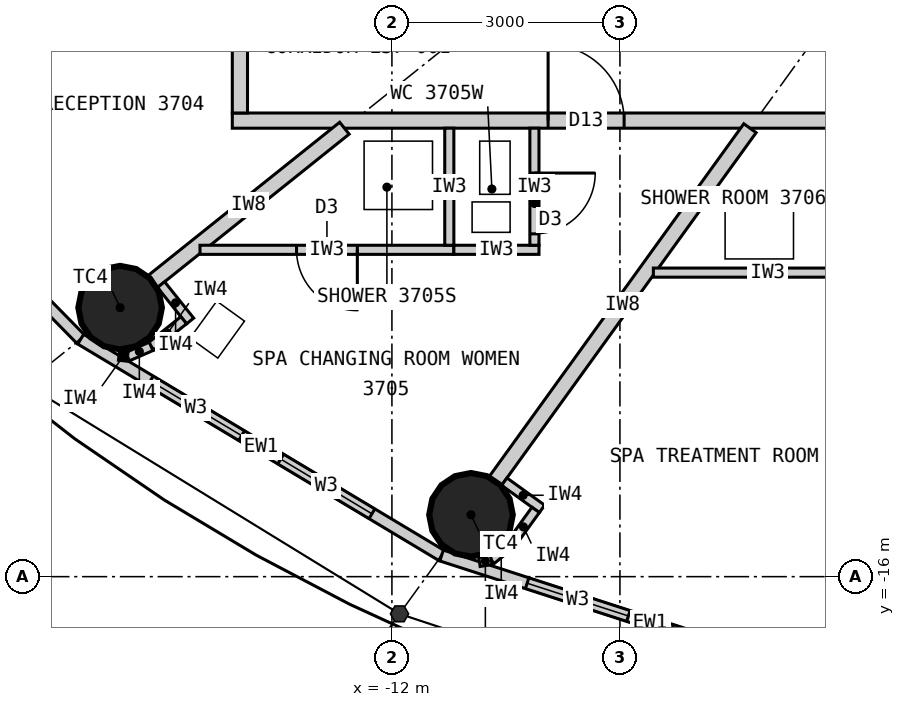
"""IFC4 building model, lengths in metres.
Left out: names, types, materials, properties, quantities, classifications, styles, units other than length and angle.
Written with IfcOpenShell. Run it as: python <this file> out.ifc"""

import sys

from ifc_helpers import new_model, si_unit, direction, frame, frame_2d, origin, origin_2d, place, context, subcontext, project, spatial, rectangle, circle, extrude, element, fill, save


model = new_model("IFC4")
c1 = context("Model", 3, precision=1e-05, world=origin(), true_north=direction((0.0, 1.0)))
c2 = subcontext(c1, "Body", "Model", "MODEL_VIEW")
j1 = project(units=[si_unit("LENGTHUNIT", "METRE"), si_unit("PLANEANGLEUNIT", "RADIAN")], contexts=[c1])
p1 = place(None, origin())
s1 = spatial("IfcSite", under=j1, at=p1, CompositionType="ELEMENT")
p2 = place(p1, origin())
s2 = spatial("IfcBuilding", under=s1, at=p2, CompositionType="ELEMENT")
p3 = place(p2, frame((0.0, 0.0, 143.4)))
s3 = spatial("IfcBuildingStorey", under=s2, at=p3, CompositionType="ELEMENT", Elevation=143.4)
for number, where, z_axis, x_axis in (
    (1, (-15.576, -12.461, 0.0), (0.0, 0.0, 1.0), (1.0, 0.0, 0.0)),
    (2, (-10.96, -15.186, 0.0), (0.0, 0.0, 1.0), (1.0, 0.0, 0.0)),
):
    element("IfcColumn", number, at=place(p3, frame(where, z_axis=z_axis, x_axis=x_axis)), inside=s3, PredefinedType="COLUMN", context=c2, shape_type="SweptSolid", body=[
        extrude(circle(Radius=0.55, at=origin_2d()), origin(), (0.0, 0.0, 1.0), 3.3),
    ])
p4 = place(p3, frame((-19.772, -9.132, 0.0), z_axis=(0.0, 0.0, 1.0), x_axis=(0.700727467776, -0.71342905457, 0.0)))
e3 = element("IfcWall", 3, at=p4, inside=s3, PredefinedType="ELEMENTEDWALL", context=c2, shape_type="SweptSolid", body=[
    extrude(rectangle(XDim=5.247, YDim=0.15, at=frame_2d((2.624, 0.0))), origin(), (0.0, 0.0, 1.0), 3.12),
])
p5 = place(p4, frame((0.924, 0.0, 0.9)))
e4 = element("IfcOpeningElement", 4, at=p5, cuts=e3, PredefinedType="OPENING", context=c2, shape_type="SweptSolid", body=[
    extrude(rectangle(XDim=1.4, YDim=1.9, at=frame_2d((0.7, 0.95))), frame((0.0, 0.085, 0.0), z_axis=(0.0, -1.0, 0.0), x_axis=(1.0, 0.0, 0.0)), (0.0, 0.0, 1.0), 0.17),
])
p6 = place(p4, frame((2.924, 0.0, 0.9)))
e5 = element("IfcOpeningElement", 5, at=p6, cuts=e3, PredefinedType="OPENING", context=c2, shape_type="SweptSolid", body=[
    extrude(rectangle(XDim=1.4, YDim=1.9, at=frame_2d((0.7, 0.95))), frame((0.0, 0.085, 0.0), z_axis=(0.0, -1.0, 0.0), x_axis=(1.0, 0.0, 0.0)), (0.0, 0.0, 1.0), 0.17),
])
p7 = place(p3, frame((-16.095, -12.876, 0.0), z_axis=(0.0, 0.0, 1.0), x_axis=(0.857695199231, -0.514158482587, 0.0)))
e6 = element("IfcWall", 6, at=p7, inside=s3, PredefinedType="ELEMENTEDWALL", context=c2, shape_type="SweptSolid", body=[
    extrude(rectangle(XDim=5.536, YDim=0.15, at=frame_2d((2.768, 0.0))), origin(), (0.0, 0.0, 1.0), 3.12),
])
p8 = place(p7, frame((1.068, 0.0, 0.9)))
e7 = element("IfcOpeningElement", 7, at=p8, cuts=e6, PredefinedType="OPENING", context=c2, shape_type="SweptSolid", body=[
    extrude(rectangle(XDim=1.4, YDim=1.9, at=frame_2d((0.7, 0.95))), frame((0.0, 0.085, 0.0), z_axis=(0.0, -1.0, 0.0), x_axis=(1.0, 0.0, 0.0)), (0.0, 0.0, 1.0), 0.17),
])
p9 = place(p7, frame((3.068, 0.0, 0.9)))
e8 = element("IfcOpeningElement", 8, at=p9, cuts=e6, PredefinedType="OPENING", context=c2, shape_type="SweptSolid", body=[
    extrude(rectangle(XDim=1.4, YDim=1.9, at=frame_2d((0.7, 0.95))), frame((0.0, 0.085, 0.0), z_axis=(0.0, -1.0, 0.0), x_axis=(1.0, 0.0, 0.0)), (0.0, 0.0, 1.0), 0.17),
])
p10 = place(p3, frame((-11.346, -15.722, 0.0), z_axis=(0.0, 0.0, 1.0), x_axis=(0.951432482129, -0.307857486429, 0.0)))
e9 = element("IfcWall", 9, at=p10, inside=s3, PredefinedType="ELEMENTEDWALL", context=c2, shape_type="SweptSolid", body=[
    extrude(rectangle(XDim=5.766, YDim=0.15, at=frame_2d((2.883, 0.0))), origin(), (0.0, 0.0, 1.0), 3.12),
])
p11 = place(p10, frame((1.183, 0.0, 0.9)))
e10 = element("IfcOpeningElement", 10, at=p11, cuts=e9, PredefinedType="OPENING", context=c2, shape_type="SweptSolid", body=[
    extrude(rectangle(XDim=1.4, YDim=1.9, at=frame_2d((0.7, 0.95))), frame((0.0, 0.085, 0.0), z_axis=(0.0, -1.0, 0.0), x_axis=(1.0, 0.0, 0.0)), (0.0, 0.0, 1.0), 0.17),
])
p12 = place(p10, frame((3.183, 0.0, 0.9)))
e11 = element("IfcOpeningElement", 11, at=p12, cuts=e9, PredefinedType="OPENING", context=c2, shape_type="SweptSolid", body=[
    extrude(rectangle(XDim=1.4, YDim=1.9, at=frame_2d((0.7, 0.95))), frame((0.0, 0.085, 0.0), z_axis=(0.0, -1.0, 0.0), x_axis=(1.0, 0.0, 0.0)), (0.0, 0.0, 1.0), 0.17),
])
p13 = place(p3, frame((14.1, -10.0, 0.0), z_axis=(0.0, 0.0, 1.0), x_axis=(-1.0, 0.0, 0.0)))
e12 = element("IfcWall", 12, at=p13, inside=s3, PredefinedType="PARTITIONING", context=c2, shape_type="SweptSolid", body=[
    extrude(rectangle(XDim=28.2, YDim=0.2, at=frame_2d((14.1, 0.0))), origin(), (0.0, 0.0, 1.0), 3.12),
])
p14 = place(p13, frame((23.045, 0.0, 0.0)))
e13 = element("IfcOpeningElement", 13, at=p14, cuts=e12, PredefinedType="OPENING", context=c2, shape_type="SweptSolid", body=[
    extrude(rectangle(XDim=1.0, YDim=2.2, at=frame_2d((0.5, 1.1))), frame((0.0, 0.11, 0.0), z_axis=(0.0, -1.0, 0.0), x_axis=(1.0, 0.0, 0.0)), (0.0, 0.0, 1.0), 0.22),
])
p15 = place(p13, frame((18.529, 0.0, 0.0)))
e14 = element("IfcOpeningElement", 14, at=p15, cuts=e12, PredefinedType="OPENING", context=c2, shape_type="SweptSolid", body=[
    extrude(rectangle(XDim=1.0, YDim=2.2, at=frame_2d((0.5, 1.1))), frame((0.0, 0.11, 0.0), z_axis=(0.0, -1.0, 0.0), x_axis=(1.0, 0.0, 0.0)), (0.0, 0.0, 1.0), 0.22),
])
p16 = place(p13, frame((13.923, 0.0, 0.0)))
e15 = element("IfcOpeningElement", 15, at=p16, cuts=e12, PredefinedType="OPENING", context=c2, shape_type="SweptSolid", body=[
    extrude(rectangle(XDim=1.0, YDim=2.2, at=frame_2d((0.5, 1.1))), frame((0.0, 0.11, 0.0), z_axis=(0.0, -1.0, 0.0), x_axis=(1.0, 0.0, 0.0)), (0.0, 0.0, 1.0), 0.22),
])
p17 = place(p13, frame((9.35, 0.0, 0.0)))
e16 = element("IfcOpeningElement", 16, at=p17, cuts=e12, PredefinedType="OPENING", context=c2, shape_type="SweptSolid", body=[
    extrude(rectangle(XDim=1.6, YDim=2.4, at=frame_2d((0.8, 1.2))), frame((0.0, 0.11, 0.0), z_axis=(0.0, -1.0, 0.0), x_axis=(1.0, 0.0, 0.0)), (0.0, 0.0, 1.0), 0.22),
])
p18 = place(p3, frame((-14.0, 9.9, 0.0), z_axis=(0.0, 0.0, 1.0), x_axis=(0.0, -1.0, 0.0)))
e17 = element("IfcWall", 17, at=p18, inside=s3, PredefinedType="PARTITIONING", context=c2, shape_type="SweptSolid", body=[
    extrude(rectangle(XDim=19.8, YDim=0.2, at=frame_2d((9.9, 0.0))), origin(), (0.0, 0.0, 1.0), 3.12),
])
p19 = place(p18, frame((8.718, 0.0, 0.0)))
e18 = element("IfcOpeningElement", 18, at=p19, cuts=e17, PredefinedType="OPENING", context=c2, shape_type="SweptSolid", body=[
    extrude(rectangle(XDim=1.0, YDim=2.2, at=frame_2d((0.5, 1.1))), frame((0.0, 0.11, 0.0), z_axis=(0.0, -1.0, 0.0), x_axis=(1.0, 0.0, 0.0)), (0.0, 0.0, 1.0), 0.22),
])
p20 = place(p18, frame((11.74, 0.0, 0.0)))
e19 = element("IfcOpeningElement", 19, at=p20, cuts=e17, PredefinedType="OPENING", context=c2, shape_type="SweptSolid", body=[
    extrude(rectangle(XDim=1.0, YDim=2.2, at=frame_2d((0.5, 1.1))), frame((0.0, 0.11, 0.0), z_axis=(0.0, -1.0, 0.0), x_axis=(1.0, 0.0, 0.0)), (0.0, 0.0, 1.0), 0.22),
])
p21 = place(p18, frame((14.782, 0.0, 0.0)))
e20 = element("IfcOpeningElement", 20, at=p21, cuts=e17, PredefinedType="OPENING", context=c2, shape_type="SweptSolid", body=[
    extrude(rectangle(XDim=1.0, YDim=2.2, at=frame_2d((0.5, 1.1))), frame((0.0, 0.11, 0.0), z_axis=(0.0, -1.0, 0.0), x_axis=(1.0, 0.0, 0.0)), (0.0, 0.0, 1.0), 0.22),
])
p22 = place(p18, frame((17.707, 0.0, 0.0)))
e21 = element("IfcOpeningElement", 21, at=p22, cuts=e17, PredefinedType="OPENING", context=c2, shape_type="SweptSolid", body=[
    extrude(rectangle(XDim=1.0, YDim=2.2, at=frame_2d((0.5, 1.1))), frame((0.0, 0.11, 0.0), z_axis=(0.0, -1.0, 0.0), x_axis=(1.0, 0.0, 0.0)), (0.0, 0.0, 1.0), 0.22),
])
p23 = place(p18, frame((3.824, 0.0, 0.0)))
e22 = element("IfcOpeningElement", 22, at=p23, cuts=e17, PredefinedType="OPENING", context=c2, shape_type="SweptSolid", body=[
    extrude(rectangle(XDim=1.0, YDim=2.2, at=frame_2d((0.5, 1.1))), frame((0.0, 0.11, 0.0), z_axis=(0.0, -1.0, 0.0), x_axis=(1.0, 0.0, 0.0)), (0.0, 0.0, 1.0), 0.22),
])
p24 = place(p3, frame((-12.625, -10.1, 0.0), z_axis=(0.0, 0.0, 1.0), x_axis=(-0.780876185034, -0.624685827954, 0.0)))
e23 = element("IfcWall", 23, at=p24, inside=s3, PredefinedType="PARTITIONING", context=c2, shape_type="SweptSolid", body=[
    extrude(rectangle(XDim=3.229, YDim=0.2, at=frame_2d((1.615, 0.0))), origin(), (0.0, 0.0, 1.0), 2.27),
])
p25 = place(p3, frame((-7.289, -10.1, 0.0), z_axis=(0.0, 0.0, 1.0), x_axis=(-0.585222595178, -0.810872686735, 0.0)))
e24 = element("IfcWall", 24, at=p25, inside=s3, PredefinedType="PARTITIONING", context=c2, shape_type="SweptSolid", body=[
    extrude(rectangle(XDim=5.722, YDim=0.2, at=frame_2d((2.861, 0.0))), origin(), (0.0, 0.0, 1.0), 2.27),
])
p26 = place(p3, frame((-14.525, -11.7, 0.0), z_axis=(0.0, 0.0, 1.0), x_axis=(1.0, 0.0, 0.0)))
e25 = element("IfcWall", 25, at=p26, inside=s3, PredefinedType="PARTITIONING", context=c2, shape_type="SweptSolid", body=[
    extrude(rectangle(XDim=3.34, YDim=0.12, at=frame_2d((1.67, 0.0))), origin(), (0.0, 0.0, 1.0), 3.12),
])
p27 = place(p26, frame((1.27, 0.0, 0.0)))
e26 = element("IfcOpeningElement", 26, at=p27, cuts=e25, PredefinedType="OPENING", context=c2, shape_type="SweptSolid", body=[
    extrude(rectangle(XDim=0.8, YDim=2.1, at=frame_2d((0.4, 1.05))), frame((0.0, 0.07, 0.0), z_axis=(0.0, -1.0, 0.0), x_axis=(1.0, 0.0, 0.0)), (0.0, 0.0, 1.0), 0.14),
])
p28 = place(p3, frame((-11.245, -10.1, 0.0), z_axis=(0.0, 0.0, 1.0), x_axis=(0.0, -1.0, 0.0)))
e27 = element("IfcWall", 27, at=p28, inside=s3, PredefinedType="PARTITIONING", context=c2, shape_type="SweptSolid", body=[
    extrude(rectangle(XDim=1.54, YDim=0.12, at=frame_2d((0.77, 0.0))), origin(), (0.0, 0.0, 1.0), 3.12),
])
p29 = place(p3, frame((-11.185, -11.7, 0.0), z_axis=(0.0, 0.0, 1.0), x_axis=(1.0, 0.0, 0.0)))
e28 = element("IfcWall", 28, at=p29, inside=s3, PredefinedType="PARTITIONING", context=c2, shape_type="SweptSolid", body=[
    extrude(rectangle(XDim=1.12, YDim=0.12, at=frame_2d((0.56, 0.0))), origin(), (0.0, 0.0, 1.0), 3.12),
])
p30 = place(p3, frame((-10.125, -10.1, 0.0), z_axis=(0.0, 0.0, 1.0), x_axis=(0.0, -1.0, 0.0)))
e29 = element("IfcWall", 29, at=p30, inside=s3, PredefinedType="PARTITIONING", context=c2, shape_type="SweptSolid", body=[
    extrude(rectangle(XDim=1.54, YDim=0.12, at=frame_2d((0.77, 0.0))), origin(), (0.0, 0.0, 1.0), 3.12),
])
p31 = place(p30, frame((0.59, 0.0, 0.0)))
e30 = element("IfcOpeningElement", 30, at=p31, cuts=e29, PredefinedType="OPENING", context=c2, shape_type="SweptSolid", body=[
    extrude(rectangle(XDim=0.8, YDim=2.1, at=frame_2d((0.4, 1.05))), frame((0.0, 0.07, 0.0), z_axis=(0.0, -1.0, 0.0), x_axis=(1.0, 0.0, 0.0)), (0.0, 0.0, 1.0), 0.14),
])
p32 = place(p3, frame((-8.56, -12.0, 0.0), z_axis=(0.0, 0.0, 1.0), x_axis=(1.0, 0.0, 0.0)))
e31 = element("IfcWall", 31, at=p32, inside=s3, PredefinedType="PARTITIONING", context=c2, shape_type="SweptSolid", body=[
    extrude(rectangle(XDim=3.011, YDim=0.12, at=frame_2d((1.506, 0.0))), origin(), (0.0, 0.0, 1.0), 3.12),
])
p33 = place(p3, frame((-15.037, -12.158, 0.0), z_axis=(0.0, 0.0, 1.0), x_axis=(0.624840920722, -0.78075208856, 0.0)))
e32 = element("IfcWall", 32, at=p33, inside=s3, PredefinedType="PARTITIONING", context=c2, shape_type="SweptSolid", body=[
    extrude(rectangle(XDim=0.612, YDim=0.12, at=frame_2d((0.306, 0.0))), origin(), (0.0, 0.0, 1.0), 3.12),
])
p34 = place(p3, frame((-14.739, -12.627, 0.0), z_axis=(0.0, 0.0, 1.0), x_axis=(-0.780912119987, -0.624640905527, 0.0)))
e33 = element("IfcWall", 33, at=p34, inside=s3, PredefinedType="PARTITIONING", context=c2, shape_type="SweptSolid", body=[
    extrude(rectangle(XDim=0.55, YDim=0.12, at=frame_2d((0.275, 0.0))), origin(), (0.0, 0.0, 1.0), 3.12),
])
p35 = place(p3, frame((-15.169, -12.97, 0.0), z_axis=(0.0, 0.0, 1.0), x_axis=(-0.915974725257, -0.401235968838, 0.0)))
e34 = element("IfcWall", 34, at=p35, inside=s3, PredefinedType="PARTITIONING", context=c2, shape_type="SweptSolid", body=[
    extrude(rectangle(XDim=0.338, YDim=0.12, at=frame_2d((0.169, 0.0))), origin(), (0.0, 0.0, 1.0), 3.12),
])
p36 = place(p3, frame((-15.478, -13.106, 0.0), z_axis=(0.0, 0.0, 1.0), x_axis=(-0.993778813557, 0.111371763588, 0.0)))
e35 = element("IfcWall", 35, at=p36, inside=s3, PredefinedType="PARTITIONING", context=c2, shape_type="SweptSolid", body=[
    extrude(rectangle(XDim=0.114, YDim=0.12, at=frame_2d((0.057, 0.0))), origin(), (0.0, 0.0, 1.0), 3.12),
])
p37 = place(p3, frame((-10.522, -14.75, 0.0), z_axis=(0.0, 0.0, 1.0), x_axis=(0.811057588427, -0.584966313777, 0.0)))
e36 = element("IfcWall", 36, at=p37, inside=s3, PredefinedType="PARTITIONING", context=c2, shape_type="SweptSolid", body=[
    extrude(rectangle(XDim=0.612, YDim=0.12, at=frame_2d((0.306, 0.0))), origin(), (0.0, 0.0, 1.0), 3.12),
])
p38 = place(p3, frame((-10.109, -15.122, 0.0), z_axis=(0.0, 0.0, 1.0), x_axis=(-0.585344718358, -0.810784534072, 0.0)))
e37 = element("IfcWall", 37, at=p38, inside=s3, PredefinedType="PARTITIONING", context=c2, shape_type="SweptSolid", body=[
    extrude(rectangle(XDim=0.55, YDim=0.12, at=frame_2d((0.275, 0.0))), origin(), (0.0, 0.0, 1.0), 3.12),
])
p39 = place(p3, frame((-10.431, -15.568, 0.0), z_axis=(0.0, 0.0, 1.0), x_axis=(-0.77505137267, -0.631898227345, 0.0)))
e38 = element("IfcWall", 38, at=p39, inside=s3, PredefinedType="PARTITIONING", context=c2, shape_type="SweptSolid", body=[
    extrude(rectangle(XDim=0.338, YDim=0.12, at=frame_2d((0.169, 0.0))), origin(), (0.0, 0.0, 1.0), 3.12),
])
p40 = place(p3, frame((-10.693, -15.781, 0.0), z_axis=(0.0, 0.0, 1.0), x_axis=(-0.987256785332, -0.159135287777, 0.0)))
e39 = element("IfcWall", 39, at=p40, inside=s3, PredefinedType="PARTITIONING", context=c2, shape_type="SweptSolid", body=[
    extrude(rectangle(XDim=0.158, YDim=0.12, at=frame_2d((0.079, 0.0))), origin(), (0.0, 0.0, 1.0), 3.12),
])
p41 = place(p8, origin())
e40 = element("IfcWindow", 40, at=p41, inside=s3, PartitioningType="SINGLE_PANEL", PredefinedType="WINDOW", context=c2, shape_type="SweptSolid", body=[
    extrude(rectangle(XDim=1.4, YDim=1.9, at=frame_2d((0.7, 0.95))), frame((0.0, 0.03, 0.0), z_axis=(0.0, -1.0, 0.0), x_axis=(1.0, 0.0, 0.0)), (0.0, 0.0, 1.0), 0.06),
])
fill(e7, e40)
p42 = place(p9, origin())
e41 = element("IfcWindow", 41, at=p42, inside=s3, PartitioningType="SINGLE_PANEL", PredefinedType="WINDOW", context=c2, shape_type="SweptSolid", body=[
    extrude(rectangle(XDim=1.4, YDim=1.9, at=frame_2d((0.7, 0.95))), frame((0.0, 0.03, 0.0), z_axis=(0.0, -1.0, 0.0), x_axis=(1.0, 0.0, 0.0)), (0.0, 0.0, 1.0), 0.06),
])
fill(e8, e41)
p43 = place(p11, origin())
e42 = element("IfcWindow", 42, at=p43, inside=s3, PartitioningType="SINGLE_PANEL", PredefinedType="WINDOW", context=c2, shape_type="SweptSolid", body=[
    extrude(rectangle(XDim=1.4, YDim=1.9, at=frame_2d((0.7, 0.95))), frame((0.0, 0.03, 0.0), z_axis=(0.0, -1.0, 0.0), x_axis=(1.0, 0.0, 0.0)), (0.0, 0.0, 1.0), 0.06),
])
fill(e10, e42)
p44 = place(p27, origin())
e43 = element("IfcDoor", 43, at=p44, inside=s3, OperationType="SINGLE_SWING_RIGHT", PredefinedType="DOOR", context=c2, shape_type="SweptSolid", body=[
    extrude(rectangle(XDim=0.8, YDim=2.1, at=frame_2d((0.4, 1.05))), frame((0.0, 0.025, 0.0), z_axis=(0.0, -1.0, 0.0), x_axis=(1.0, 0.0, 0.0)), (0.0, 0.0, 1.0), 0.05),
])
fill(e26, e43)
p45 = place(p31, origin())
e44 = element("IfcDoor", 44, at=p45, inside=s3, OperationType="SINGLE_SWING_LEFT", PredefinedType="DOOR", context=c2, shape_type="SweptSolid", body=[
    extrude(rectangle(XDim=0.8, YDim=2.1, at=frame_2d((0.4, 1.05))), frame((0.0, 0.025, 0.0), z_axis=(0.0, -1.0, 0.0), x_axis=(1.0, 0.0, 0.0)), (0.0, 0.0, 1.0), 0.05),
])
fill(e30, e44)
p46 = place(p14, origin())
e45 = element("IfcDoor", 45, at=p46, inside=s3, OperationType="SINGLE_SWING_RIGHT", PredefinedType="DOOR", context=c2, shape_type="SweptSolid", body=[
    extrude(rectangle(XDim=1.0, YDim=2.2, at=frame_2d((0.5, 1.1))), frame((0.0, 0.025, 0.0), z_axis=(0.0, -1.0, 0.0), x_axis=(1.0, 0.0, 0.0)), (0.0, 0.0, 1.0), 0.05),
])
fill(e13, e45)
save(model, sys.argv[1])
